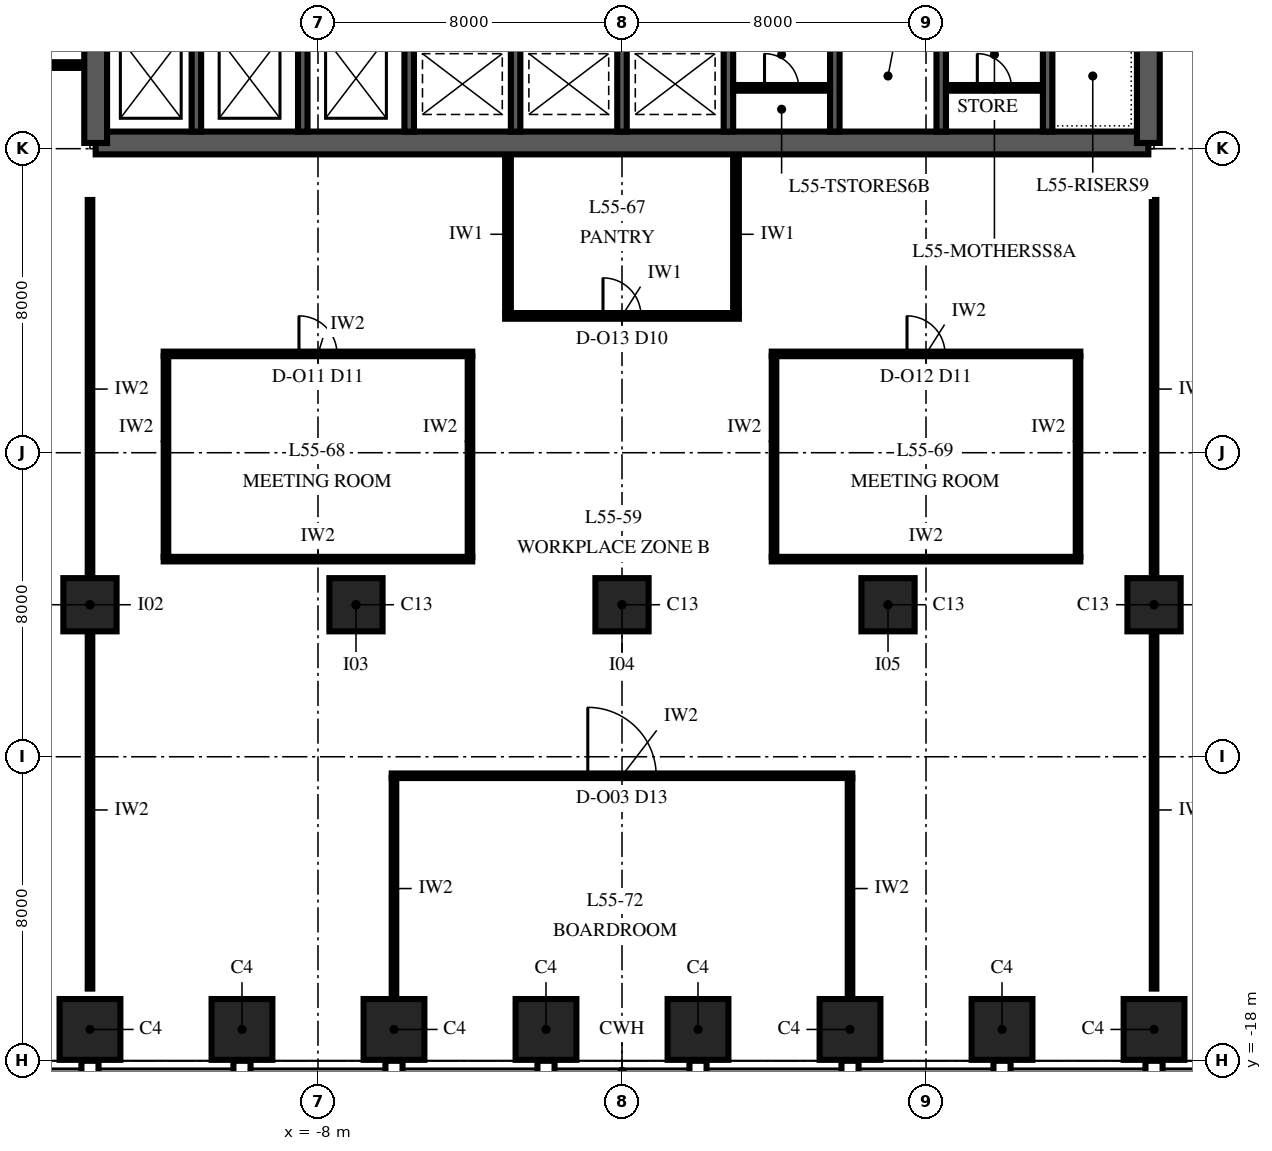
"""IFC4 building model, lengths in metres.
Left out: names, types, materials, properties, quantities, classifications, styles, units other than length and angle.
Written with IfcOpenShell. Run it as: python <this file> out.ifc"""

import sys

from ifc_helpers import new_model, si_unit, direction, frame, frame_2d, origin, origin_2d, place, context, subcontext, project, spatial, polyline, rectangle, outline, extrude, element, fill, save


model = new_model("IFC4")
c1 = context("Model", 3, precision=1e-05, world=origin(), true_north=direction((0.0, 1.0)))
c2 = subcontext(c1, "Body", "Model", "MODEL_VIEW")
j1 = project(units=[si_unit("LENGTHUNIT", "METRE"), si_unit("PLANEANGLEUNIT", "RADIAN")], contexts=[c1])
p1 = place(None, origin())
s1 = spatial("IfcSite", under=j1, at=p1, CompositionType="ELEMENT")
p2 = place(p1, origin())
s2 = spatial("IfcBuilding", under=s1, at=p2, CompositionType="ELEMENT")
p3 = place(p2, frame((0.0, 0.0, 238.0)))
s3 = spatial("IfcBuildingStorey", under=s2, at=p3, CompositionType="ELEMENT", Elevation=238.0)
for number, where, z_axis, x_axis in (
    (1, (-14.0, -17.175, 0.0), (0.0, 0.0, 1.0), (1.0, 0.0, 0.0)),
    (2, (-10.0, -17.175, 0.0), (0.0, 0.0, 1.0), (1.0, 0.0, 0.0)),
    (3, (-6.0, -17.175, 0.0), (0.0, 0.0, 1.0), (1.0, 0.0, 0.0)),
    (4, (-2.0, -17.175, 0.0), (0.0, 0.0, 1.0), (1.0, 0.0, 0.0)),
    (5, (2.0, -17.175, 0.0), (0.0, 0.0, 1.0), (1.0, 0.0, 0.0)),
    (6, (6.0, -17.175, 0.0), (0.0, 0.0, 1.0), (1.0, 0.0, 0.0)),
    (7, (10.0, -17.175, 0.0), (0.0, 0.0, 1.0), (1.0, 0.0, 0.0)),
    (8, (14.0, -17.175, 0.0), (0.0, 0.0, 1.0), (1.0, 0.0, 0.0)),
):
    element("IfcColumn", number, at=place(p3, frame(where, z_axis=z_axis, x_axis=x_axis)), inside=s3, PredefinedType="COLUMN", context=c2, shape_type="SweptSolid", body=[
        extrude(rectangle(XDim=1.6, YDim=1.6, at=origin_2d()), origin(), (0.0, 0.0, 1.0), 4.0),
    ])
for number, where, z_axis, x_axis in (
    (9, (-14.0, -6.0, 0.0), (0.0, 0.0, 1.0), (1.0, 0.0, 0.0)),
    (10, (-7.0, -6.0, 0.0), (0.0, 0.0, 1.0), (1.0, 0.0, 0.0)),
    (11, (0.0, -6.0, 0.0), (0.0, 0.0, 1.0), (1.0, 0.0, 0.0)),
    (12, (7.0, -6.0, 0.0), (0.0, 0.0, 1.0), (1.0, 0.0, 0.0)),
    (13, (14.0, -6.0, 0.0), (0.0, 0.0, 1.0), (1.0, 0.0, 0.0)),
):
    element("IfcColumn", number, at=place(p3, frame(where, z_axis=z_axis, x_axis=x_axis)), inside=s3, PredefinedType="COLUMN", context=c2, shape_type="SweptSolid", body=[
        extrude(rectangle(XDim=1.4, YDim=1.4, at=origin_2d()), origin(), (0.0, 0.0, 1.0), 4.0),
    ])
p4 = place(p3, frame((-13.85, 6.15, 0.0), z_axis=(0.0, 0.0, 1.0), x_axis=(1.0, 0.0, 0.0)))
e14 = element("IfcWall", 14, at=p4, inside=s3, PredefinedType="SHEAR", context=c2, shape_type="SweptSolid", body=[
    extrude(rectangle(XDim=27.7, YDim=0.6, at=frame_2d((13.85, 0.0))), origin(), (0.0, 0.0, 1.0), 4.0),
])
p5 = place(p3, frame((13.85, 6.15, 0.0), z_axis=(0.0, 0.0, 1.0), x_axis=(0.0, 1.0, 0.0)))
e15 = element("IfcWall", 15, at=p5, inside=s3, PredefinedType="SHEAR", context=c2, shape_type="SweptSolid", body=[
    extrude(outline(polyline([(0.0, -0.3), (17.7, -0.3), (17.7, 0.0), (17.4, 0.0), (17.4, 0.3), (0.3, 0.3), (0.3, 0.0), (0.0, 0.0), (0.0, -0.3)])), origin(), (0.0, 0.0, 1.0), 4.0),
])
p6 = place(p5, frame((4.15, 0.0, 0.0)))
e16 = element("IfcOpeningElement", 16, at=p6, cuts=e15, PredefinedType="OPENING", context=c2, shape_type="SweptSolid", body=[
    extrude(rectangle(XDim=1.8, YDim=2.4, at=frame_2d((0.9, 1.2))), frame((0.0, 0.315, 0.0), z_axis=(0.0, -1.0, 0.0), x_axis=(1.0, 0.0, 0.0)), (0.0, 0.0, 1.0), 0.63),
])
p7 = place(p3, frame((-13.85, 23.85, 0.0), z_axis=(0.0, 0.0, 1.0), x_axis=(0.0, -1.0, 0.0)))
e17 = element("IfcWall", 17, at=p7, inside=s3, PredefinedType="SHEAR", context=c2, shape_type="SweptSolid", body=[
    extrude(outline(polyline([(0.0, -0.3), (17.7, -0.3), (17.7, 0.0), (17.4, 0.0), (17.4, 0.3), (0.3, 0.3), (0.3, 0.0), (0.0, 0.0), (0.0, -0.3)])), origin(), (0.0, 0.0, 1.0), 4.0),
])
p8 = place(p7, frame((11.75, 0.0, 0.0)))
e18 = element("IfcOpeningElement", 18, at=p8, cuts=e17, PredefinedType="OPENING", context=c2, shape_type="SweptSolid", body=[
    extrude(rectangle(XDim=1.8, YDim=2.4, at=frame_2d((0.9, 1.2))), frame((0.0, 0.315, 0.0), z_axis=(0.0, -1.0, 0.0), x_axis=(1.0, 0.0, 0.0)), (0.0, 0.0, 1.0), 0.63),
])
for number, where, z_axis, x_axis in (
    (19, (-11.2, 6.45, 0.0), (0.0, 0.0, 1.0), (0.0, 1.0, 0.0)),
    (20, (-8.4, 6.45, 0.0), (0.0, 0.0, 1.0), (0.0, 1.0, 0.0)),
    (21, (-5.6, 6.45, 0.0), (0.0, 0.0, 1.0), (0.0, 1.0, 0.0)),
    (22, (-2.8, 6.45, 0.0), (0.0, 0.0, 1.0), (0.0, 1.0, 0.0)),
    (23, (0.0, 6.45, 0.0), (0.0, 0.0, 1.0), (0.0, 1.0, 0.0)),
    (24, (2.8, 6.45, 0.0), (0.0, 0.0, 1.0), (0.0, 1.0, 0.0)),
    (25, (5.6, 6.45, 0.0), (0.0, 0.0, 1.0), (0.0, 1.0, 0.0)),
    (26, (8.4, 6.45, 0.0), (0.0, 0.0, 1.0), (0.0, 1.0, 0.0)),
    (27, (11.2, 6.45, 0.0), (0.0, 0.0, 1.0), (0.0, 1.0, 0.0)),
):
    element("IfcWall", number, at=place(p3, frame(where, z_axis=z_axis, x_axis=x_axis)), inside=s3, PredefinedType="SHEAR", context=c2, shape_type="SweptSolid", body=[
        extrude(rectangle(XDim=2.825, YDim=0.25, at=frame_2d((1.413, 0.0))), origin(), (0.0, 0.0, 1.0), 4.0),
    ])
p9 = place(p3, frame((2.925, 7.6, 0.0), z_axis=(0.0, 0.0, 1.0), x_axis=(1.0, 0.0, 0.0)))
e28 = element("IfcWall", 28, at=p9, inside=s3, PredefinedType="PARTITIONING", context=c2, shape_type="SweptSolid", body=[
    extrude(rectangle(XDim=2.55, YDim=0.15, at=frame_2d((1.275, 0.0))), origin(), (0.0, 0.0, 1.0), 3.85),
])
p10 = place(p9, frame((0.825, 0.0, 0.0)))
e29 = element("IfcOpeningElement", 29, at=p10, cuts=e28, PredefinedType="OPENING", context=c2, shape_type="SweptSolid", body=[
    extrude(rectangle(XDim=0.9, YDim=2.1, at=frame_2d((0.45, 1.05))), frame((0.0, 0.09, 0.0), z_axis=(0.0, -1.0, 0.0), x_axis=(1.0, 0.0, 0.0)), (0.0, 0.0, 1.0), 0.18),
])
p11 = place(p3, frame((8.525, 7.6, 0.0), z_axis=(0.0, 0.0, 1.0), x_axis=(1.0, 0.0, 0.0)))
e30 = element("IfcWall", 30, at=p11, inside=s3, PredefinedType="PARTITIONING", context=c2, shape_type="SweptSolid", body=[
    extrude(rectangle(XDim=2.55, YDim=0.15, at=frame_2d((1.275, 0.0))), origin(), (0.0, 0.0, 1.0), 3.85),
])
p12 = place(p11, frame((0.825, 0.0, 0.0)))
e31 = element("IfcOpeningElement", 31, at=p12, cuts=e30, PredefinedType="OPENING", context=c2, shape_type="SweptSolid", body=[
    extrude(rectangle(XDim=0.9, YDim=2.1, at=frame_2d((0.45, 1.05))), frame((0.0, 0.09, 0.0), z_axis=(0.0, -1.0, 0.0), x_axis=(1.0, 0.0, 0.0)), (0.0, 0.0, 1.0), 0.18),
])
p13 = place(p3, frame((-6.06, -10.5, 0.0), z_axis=(0.0, 0.0, 1.0), x_axis=(1.0, 0.0, 0.0)))
e32 = element("IfcWall", 32, at=p13, inside=s3, PredefinedType="PARTITIONING", context=c2, shape_type="SweptSolid", body=[
    extrude(rectangle(XDim=12.12, YDim=0.12, at=frame_2d((6.06, 0.0))), origin(), (0.0, 0.0, 1.0), 3.13),
])
p14 = place(p13, frame((5.16, 0.0, 0.0)))
e33 = element("IfcOpeningElement", 33, at=p14, cuts=e32, PredefinedType="OPENING", context=c2, shape_type="SweptSolid", body=[
    extrude(rectangle(XDim=1.8, YDim=2.4, at=frame_2d((0.9, 1.2))), frame((0.0, 0.075, 0.0), z_axis=(0.0, -1.0, 0.0), x_axis=(1.0, 0.0, 0.0)), (0.0, 0.0, 1.0), 0.15),
])
for number, where, z_axis, x_axis in (
    (34, (-12.06, -4.8, 0.0), (0.0, 0.0, 1.0), (1.0, 0.0, 0.0)),
    (35, (3.94, -4.8, 0.0), (0.0, 0.0, 1.0), (1.0, 0.0, 0.0)),
):
    element("IfcWall", number, at=place(p3, frame(where, z_axis=z_axis, x_axis=x_axis)), inside=s3, PredefinedType="PARTITIONING", context=c2, shape_type="SweptSolid", body=[
        extrude(rectangle(XDim=8.12, YDim=0.12, at=frame_2d((4.06, 0.0))), origin(), (0.0, 0.0, 1.0), 3.13),
    ])
p15 = place(p3, frame((-12.06, 0.6, 0.0), z_axis=(0.0, 0.0, 1.0), x_axis=(1.0, 0.0, 0.0)))
e36 = element("IfcWall", 36, at=p15, inside=s3, PredefinedType="PARTITIONING", context=c2, shape_type="SweptSolid", body=[
    extrude(rectangle(XDim=8.12, YDim=0.12, at=frame_2d((4.06, 0.0))), origin(), (0.0, 0.0, 1.0), 3.13),
])
p16 = place(p15, frame((3.56, 0.0, 0.0)))
e37 = element("IfcOpeningElement", 37, at=p16, cuts=e36, PredefinedType="OPENING", context=c2, shape_type="SweptSolid", body=[
    extrude(rectangle(XDim=1.0, YDim=2.4, at=frame_2d((0.5, 1.2))), frame((0.0, 0.075, 0.0), z_axis=(0.0, -1.0, 0.0), x_axis=(1.0, 0.0, 0.0)), (0.0, 0.0, 1.0), 0.15),
])
p17 = place(p3, frame((3.94, 0.6, 0.0), z_axis=(0.0, 0.0, 1.0), x_axis=(1.0, 0.0, 0.0)))
e38 = element("IfcWall", 38, at=p17, inside=s3, PredefinedType="PARTITIONING", context=c2, shape_type="SweptSolid", body=[
    extrude(rectangle(XDim=8.12, YDim=0.12, at=frame_2d((4.06, 0.0))), origin(), (0.0, 0.0, 1.0), 3.13),
])
p18 = place(p17, frame((3.56, 0.0, 0.0)))
e39 = element("IfcOpeningElement", 39, at=p18, cuts=e38, PredefinedType="OPENING", context=c2, shape_type="SweptSolid", body=[
    extrude(rectangle(XDim=1.0, YDim=2.4, at=frame_2d((0.5, 1.2))), frame((0.0, 0.075, 0.0), z_axis=(0.0, -1.0, 0.0), x_axis=(1.0, 0.0, 0.0)), (0.0, 0.0, 1.0), 0.15),
])
p19 = place(p3, frame((-3.075, 1.6, 0.0), z_axis=(0.0, 0.0, 1.0), x_axis=(1.0, 0.0, 0.0)))
e40 = element("IfcWall", 40, at=p19, inside=s3, PredefinedType="PARTITIONING", context=c2, shape_type="SweptSolid", body=[
    extrude(rectangle(XDim=6.15, YDim=0.15, at=frame_2d((3.075, 0.0))), origin(), (0.0, 0.0, 1.0), 3.13),
])
p20 = place(p19, frame((2.575, 0.0, 0.0)))
e41 = element("IfcOpeningElement", 41, at=p20, cuts=e40, PredefinedType="OPENING", context=c2, shape_type="SweptSolid", body=[
    extrude(rectangle(XDim=1.0, YDim=2.3, at=frame_2d((0.5, 1.15))), frame((0.0, 0.09, 0.0), z_axis=(0.0, -1.0, 0.0), x_axis=(1.0, 0.0, 0.0)), (0.0, 0.0, 1.0), 0.18),
])
p21 = place(p3, frame((-20.225, 8.2, 0.0), z_axis=(0.0, 0.0, 1.0), x_axis=(1.0, 0.0, 0.0)))
e42 = element("IfcWall", 42, at=p21, inside=s3, PredefinedType="PARTITIONING", context=c2, shape_type="SweptSolid", body=[
    extrude(rectangle(XDim=6.045, YDim=0.15, at=frame_2d((3.022, 0.0))), origin(), (0.0, 0.0, 1.0), 3.75),
])
p22 = place(p3, frame((-12.0, -4.74, 0.0), z_axis=(0.0, 0.0, 1.0), x_axis=(0.0, 1.0, 0.0)))
e43 = element("IfcWall", 43, at=p22, inside=s3, PredefinedType="PARTITIONING", context=c2, shape_type="SweptSolid", body=[
    extrude(rectangle(XDim=5.28, YDim=0.12, at=frame_2d((2.64, 0.0))), origin(), (0.0, 0.0, 1.0), 3.75),
])
p23 = place(p3, frame((-6.0, -16.375, 0.0), z_axis=(0.0, 0.0, 1.0), x_axis=(0.0, 1.0, 0.0)))
e44 = element("IfcWall", 44, at=p23, inside=s3, PredefinedType="PARTITIONING", context=c2, shape_type="SweptSolid", body=[
    extrude(rectangle(XDim=5.815, YDim=0.12, at=frame_2d((2.907, 0.0))), origin(), (0.0, 0.0, 1.0), 3.13),
])
p24 = place(p3, frame((-4.0, -4.74, 0.0), z_axis=(0.0, 0.0, 1.0), x_axis=(0.0, 1.0, 0.0)))
e45 = element("IfcWall", 45, at=p24, inside=s3, PredefinedType="PARTITIONING", context=c2, shape_type="SweptSolid", body=[
    extrude(rectangle(XDim=5.28, YDim=0.12, at=frame_2d((2.64, 0.0))), origin(), (0.0, 0.0, 1.0), 3.75),
])
for number, where, z_axis, x_axis in (
    (46, (-3.0, 1.675, 0.0), (0.0, 0.0, 1.0), (0.0, 1.0, 0.0)),
    (47, (3.0, 1.675, 0.0), (0.0, 0.0, 1.0), (0.0, 1.0, 0.0)),
):
    element("IfcWall", number, at=place(p3, frame(where, z_axis=z_axis, x_axis=x_axis)), inside=s3, PredefinedType="PARTITIONING", context=c2, shape_type="SweptSolid", body=[
        extrude(rectangle(XDim=4.145, YDim=0.15, at=frame_2d((2.073, 0.0))), origin(), (0.0, 0.0, 1.0), 3.75),
    ])
p25 = place(p3, frame((4.0, -4.74, 0.0), z_axis=(0.0, 0.0, 1.0), x_axis=(0.0, 1.0, 0.0)))
e48 = element("IfcWall", 48, at=p25, inside=s3, PredefinedType="PARTITIONING", context=c2, shape_type="SweptSolid", body=[
    extrude(rectangle(XDim=5.28, YDim=0.12, at=frame_2d((2.64, 0.0))), origin(), (0.0, 0.0, 1.0), 3.75),
])
p26 = place(p3, frame((6.0, -16.375, 0.0), z_axis=(0.0, 0.0, 1.0), x_axis=(0.0, 1.0, 0.0)))
e49 = element("IfcWall", 49, at=p26, inside=s3, PredefinedType="PARTITIONING", context=c2, shape_type="SweptSolid", body=[
    extrude(rectangle(XDim=5.815, YDim=0.12, at=frame_2d((2.907, 0.0))), origin(), (0.0, 0.0, 1.0), 3.13),
])
p27 = place(p3, frame((12.0, -4.74, 0.0), z_axis=(0.0, 0.0, 1.0), x_axis=(0.0, 1.0, 0.0)))
e50 = element("IfcWall", 50, at=p27, inside=s3, PredefinedType="PARTITIONING", context=c2, shape_type="SweptSolid", body=[
    extrude(rectangle(XDim=5.28, YDim=0.12, at=frame_2d((2.64, 0.0))), origin(), (0.0, 0.0, 1.0), 3.75),
])
p28 = place(p3, frame((-13.999, -16.1, 0.0), z_axis=(0.0, 0.0, 1.0), x_axis=(0.0, 1.0, 0.0)))
e51 = element("IfcWall", 51, at=p28, inside=s3, PredefinedType="PARTITIONING", context=c2, shape_type="SweptSolid", body=[
    extrude(rectangle(XDim=9.4, YDim=0.12, at=frame_2d((4.7, 0.0))), origin(), (0.0, 0.0, 1.0), 3.13),
])
p29 = place(p3, frame((-13.999, -5.3, 0.0), z_axis=(0.0, 0.0, 1.0), x_axis=(0.0, 1.0, 0.0)))
e52 = element("IfcWall", 52, at=p29, inside=s3, PredefinedType="PARTITIONING", context=c2, shape_type="SweptSolid", body=[
    extrude(rectangle(XDim=9.95, YDim=0.12, at=frame_2d((4.975, 0.0))), origin(), (0.0, 0.0, 1.0), 3.13),
])
p30 = place(p3, frame((14.001, -16.1, 0.0), z_axis=(0.0, 0.0, 1.0), x_axis=(0.0, 1.0, 0.0)))
e53 = element("IfcWall", 53, at=p30, inside=s3, PredefinedType="PARTITIONING", context=c2, shape_type="SweptSolid", body=[
    extrude(rectangle(XDim=9.4, YDim=0.12, at=frame_2d((4.7, 0.0))), origin(), (0.0, 0.0, 1.0), 3.13),
])
p31 = place(p3, frame((14.001, -5.3, 0.0), z_axis=(0.0, 0.0, 1.0), x_axis=(0.0, 1.0, 0.0)))
e54 = element("IfcWall", 54, at=p31, inside=s3, PredefinedType="PARTITIONING", context=c2, shape_type="SweptSolid", body=[
    extrude(rectangle(XDim=9.95, YDim=0.12, at=frame_2d((4.975, 0.0))), origin(), (0.0, 0.0, 1.0), 3.13),
])
p32 = place(p10, origin())
e55 = element("IfcDoor", 55, at=p32, inside=s3, OperationType="SINGLE_SWING_LEFT", PredefinedType="DOOR", context=c2, shape_type="SweptSolid", body=[
    extrude(rectangle(XDim=0.9, YDim=2.1, at=frame_2d((0.45, 1.05))), frame((0.0, 0.075, 0.0), z_axis=(0.0, -1.0, 0.0), x_axis=(1.0, 0.0, 0.0)), (0.0, 0.0, 1.0), 0.149),
])
fill(e29, e55)
p33 = place(p12, origin())
e56 = element("IfcDoor", 56, at=p33, inside=s3, OperationType="SINGLE_SWING_LEFT", PredefinedType="DOOR", context=c2, shape_type="SweptSolid", body=[
    extrude(rectangle(XDim=0.9, YDim=2.1, at=frame_2d((0.45, 1.05))), frame((0.0, 0.075, 0.0), z_axis=(0.0, -1.0, 0.0), x_axis=(1.0, 0.0, 0.0)), (0.0, 0.0, 1.0), 0.149),
])
fill(e31, e56)
p34 = place(p14, origin())
e57 = element("IfcDoor", 57, at=p34, inside=s3, OperationType="DOUBLE_DOOR_SINGLE_SWING", PredefinedType="DOOR", context=c2, shape_type="SweptSolid", body=[
    extrude(rectangle(XDim=1.8, YDim=2.4, at=frame_2d((0.9, 1.2))), frame((0.0, 0.06, 0.0), z_axis=(0.0, -1.0, 0.0), x_axis=(1.0, 0.0, 0.0)), (0.0, 0.0, 1.0), 0.12),
])
fill(e33, e57)
p35 = place(p16, origin())
e58 = element("IfcDoor", 58, at=p35, inside=s3, OperationType="SINGLE_SWING_RIGHT", PredefinedType="DOOR", context=c2, shape_type="SweptSolid", body=[
    extrude(rectangle(XDim=1.0, YDim=2.4, at=frame_2d((0.5, 1.2))), frame((0.0, 0.06, 0.0), z_axis=(0.0, -1.0, 0.0), x_axis=(1.0, 0.0, 0.0)), (0.0, 0.0, 1.0), 0.12),
])
fill(e37, e58)
p36 = place(p18, origin())
e59 = element("IfcDoor", 59, at=p36, inside=s3, OperationType="SINGLE_SWING_RIGHT", PredefinedType="DOOR", context=c2, shape_type="SweptSolid", body=[
    extrude(rectangle(XDim=1.0, YDim=2.4, at=frame_2d((0.5, 1.2))), frame((0.0, 0.06, 0.0), z_axis=(0.0, -1.0, 0.0), x_axis=(1.0, 0.0, 0.0)), (0.0, 0.0, 1.0), 0.12),
])
fill(e39, e59)
p37 = place(p20, origin())
e60 = element("IfcDoor", 60, at=p37, inside=s3, OperationType="SINGLE_SWING_LEFT", PredefinedType="DOOR", context=c2, shape_type="SweptSolid", body=[
    extrude(rectangle(XDim=1.0, YDim=2.3, at=frame_2d((0.5, 1.15))), frame((0.0, 0.075, 0.0), z_axis=(0.0, -1.0, 0.0), x_axis=(1.0, 0.0, 0.0)), (0.0, 0.0, 1.0), 0.149),
])
fill(e41, e60)
save(model, sys.argv[1])
